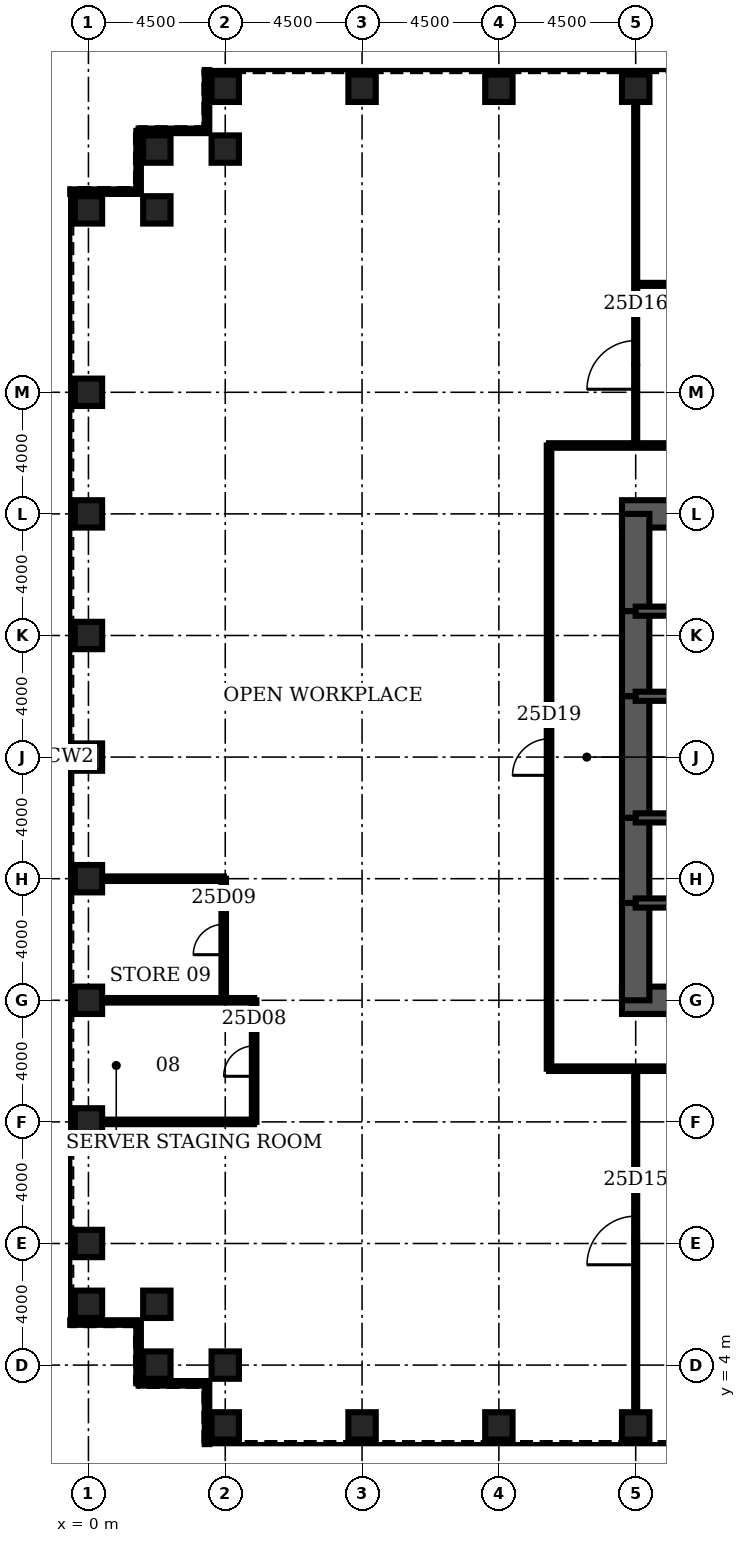
"""IFC4 building model, lengths in metres.
Left out: names, types, materials, properties, quantities, classifications, styles, units other than length and angle.
Written with IfcOpenShell. Run it as: python <this file> out.ifc"""

import sys

from ifc_helpers import new_model, si_unit, direction, frame, frame_2d, origin, origin_2d, place, context, subcontext, project, spatial, rectangle, hollow_rectangle, extrude, element, fill, save


model = new_model("IFC4")
c1 = context("Model", 3, precision=1e-05, world=origin(), true_north=direction((0.0, 1.0)))
c2 = subcontext(c1, "Body", "Model", "MODEL_VIEW")
j1 = project(units=[si_unit("LENGTHUNIT", "METRE"), si_unit("PLANEANGLEUNIT", "RADIAN")], contexts=[c1])
p1 = place(None, origin())
s1 = spatial("IfcSite", under=j1, at=p1, CompositionType="ELEMENT")
p2 = place(p1, origin())
s2 = spatial("IfcBuilding", under=s1, at=p2, CompositionType="ELEMENT")
p3 = place(p2, frame((0.0, 0.0, 117.3)))
s3 = spatial("IfcBuildingStorey", under=s2, at=p3, CompositionType="ELEMENT", Elevation=117.3)
for number, where, z_axis, x_axis in (
    (1, (4.5, 2.0, 0.0), (0.0, 0.0, 1.0), (0.0, 1.0, 0.0)),
    (2, (9.0, 2.0, 0.0), (0.0, 0.0, 1.0), (0.0, 1.0, 0.0)),
    (3, (13.5, 2.0, 0.0), (0.0, 0.0, 1.0), (0.0, 1.0, 0.0)),
    (4, (18.0, 2.0, 0.0), (0.0, 0.0, 1.0), (0.0, 1.0, 0.0)),
    (5, (18.0, 46.0, 0.0), (0.0, 0.0, 1.0), (0.0, 1.0, 0.0)),
    (6, (13.5, 46.0, 0.0), (0.0, 0.0, 1.0), (0.0, 1.0, 0.0)),
    (7, (9.0, 46.0, 0.0), (0.0, 0.0, 1.0), (0.0, 1.0, 0.0)),
    (8, (4.5, 46.0, 0.0), (0.0, 0.0, 1.0), (0.0, 1.0, 0.0)),
    (9, (4.5, 44.0, 0.0), (0.0, 0.0, 1.0), (0.0, 1.0, 0.0)),
    (10, (2.25, 44.0, 0.0), (0.0, 0.0, 1.0), (1.0, 0.0, 0.0)),
    (11, (2.25, 42.0, 0.0), (0.0, 0.0, 1.0), (1.0, 0.0, 0.0)),
    (12, (0.0, 42.0, 0.0), (0.0, 0.0, 1.0), (1.0, 0.0, 0.0)),
    (13, (0.0, 36.0, 0.0), (0.0, 0.0, 1.0), (1.0, 0.0, 0.0)),
    (14, (0.0, 32.0, 0.0), (0.0, 0.0, 1.0), (1.0, 0.0, 0.0)),
    (15, (0.0, 28.0, 0.0), (0.0, 0.0, 1.0), (1.0, 0.0, 0.0)),
    (16, (0.0, 24.0, 0.0), (0.0, 0.0, 1.0), (1.0, 0.0, 0.0)),
    (17, (0.0, 20.0, 0.0), (0.0, 0.0, 1.0), (1.0, 0.0, 0.0)),
    (18, (0.0, 16.0, 0.0), (0.0, 0.0, 1.0), (1.0, 0.0, 0.0)),
    (19, (0.0, 12.0, 0.0), (0.0, 0.0, 1.0), (1.0, 0.0, 0.0)),
    (20, (0.0, 8.0, 0.0), (0.0, 0.0, 1.0), (1.0, 0.0, 0.0)),
    (21, (0.0, 6.0, 0.0), (0.0, 0.0, 1.0), (1.0, 0.0, 0.0)),
    (22, (2.25, 6.0, 0.0), (0.0, 0.0, 1.0), (1.0, 0.0, 0.0)),
    (23, (2.25, 4.0, 0.0), (0.0, 0.0, 1.0), (1.0, 0.0, 0.0)),
    (24, (4.5, 4.0, 0.0), (0.0, 0.0, 1.0), (0.0, 1.0, 0.0)),
):
    element("IfcColumn", number, at=place(p3, frame(where, z_axis=z_axis, x_axis=x_axis)), inside=s3, PredefinedType="COLUMN", context=c2, shape_type="SweptSolid", body=[
        extrude(hollow_rectangle(XDim=0.9, YDim=0.9, WallThickness=0.11, at=origin_2d()), origin(), (0.0, 0.0, 1.0), 4.2),
    ])
for number, where, z_axis, x_axis in (
    (25, (17.55, 16.0, 0.0), (0.0, 0.0, 1.0), (1.0, 0.0, 0.0)),
    (26, (27.0, 32.0, 0.0), (0.0, 0.0, 1.0), (-1.0, 0.0, 0.0)),
):
    element("IfcWall", number, at=place(p3, frame(where, z_axis=z_axis, x_axis=x_axis)), inside=s3, PredefinedType="SHEAR", context=c2, shape_type="SweptSolid", body=[
        extrude(rectangle(XDim=9.45, YDim=0.9, at=frame_2d((4.725, 0.0))), origin(), (0.0, 0.0, 1.0), 4.2),
    ])
p4 = place(p3, frame((18.0, 32.0, 0.0), z_axis=(0.0, 0.0, 1.0), x_axis=(0.0, -1.0, 0.0)))
e27 = element("IfcWall", 27, at=p4, inside=s3, PredefinedType="SHEAR", context=c2, shape_type="SweptSolid", body=[
    extrude(rectangle(XDim=3.2, YDim=0.9, at=frame_2d((1.6, 0.0))), origin(), (0.0, 0.0, 1.0), 4.2),
])
p5 = place(p3, frame((18.0, 28.8, 0.0), z_axis=(0.0, 0.0, 1.0), x_axis=(0.0, -1.0, 0.0)))
e28 = element("IfcWall", 28, at=p5, inside=s3, PredefinedType="SHEAR", context=c2, shape_type="SweptSolid", body=[
    extrude(rectangle(XDim=2.8, YDim=0.9, at=frame_2d((1.4, 0.0))), origin(), (0.0, 0.0, 1.0), 4.2),
])
p6 = place(p5, frame((0.4, 0.0, 0.0)))
e29 = element("IfcOpeningElement", 29, at=p6, cuts=e28, PredefinedType="OPENING", context=c2, shape_type="SweptSolid", body=[
    extrude(rectangle(XDim=1.8, YDim=2.1, at=frame_2d((0.9, 1.05))), frame((0.0, 0.46, 0.0), z_axis=(0.0, -1.0, 0.0), x_axis=(1.0, 0.0, 0.0)), (0.0, 0.0, 1.0), 0.92),
])
p7 = place(p3, frame((18.0, 26.0, 0.0), z_axis=(0.0, 0.0, 1.0), x_axis=(0.0, -1.0, 0.0)))
e30 = element("IfcWall", 30, at=p7, inside=s3, PredefinedType="SHEAR", context=c2, shape_type="SweptSolid", body=[
    extrude(rectangle(XDim=4.0, YDim=0.9, at=frame_2d((2.0, 0.0))), origin(), (0.0, 0.0, 1.0), 4.2),
])
p8 = place(p3, frame((18.0, 22.0, 0.0), z_axis=(0.0, 0.0, 1.0), x_axis=(0.0, -1.0, 0.0)))
e31 = element("IfcWall", 31, at=p8, inside=s3, PredefinedType="SHEAR", context=c2, shape_type="SweptSolid", body=[
    extrude(rectangle(XDim=2.8, YDim=0.9, at=frame_2d((1.4, 0.0))), origin(), (0.0, 0.0, 1.0), 4.2),
])
p9 = place(p8, frame((0.6, 0.0, 0.0)))
e32 = element("IfcOpeningElement", 32, at=p9, cuts=e31, PredefinedType="OPENING", context=c2, shape_type="SweptSolid", body=[
    extrude(rectangle(XDim=1.8, YDim=2.1, at=frame_2d((0.9, 1.05))), frame((0.0, 0.46, 0.0), z_axis=(0.0, -1.0, 0.0), x_axis=(1.0, 0.0, 0.0)), (0.0, 0.0, 1.0), 0.92),
])
p10 = place(p3, frame((18.0, 19.2, 0.0), z_axis=(0.0, 0.0, 1.0), x_axis=(0.0, -1.0, 0.0)))
e33 = element("IfcWall", 33, at=p10, inside=s3, PredefinedType="SHEAR", context=c2, shape_type="SweptSolid", body=[
    extrude(rectangle(XDim=3.2, YDim=0.9, at=frame_2d((1.6, 0.0))), origin(), (0.0, 0.0, 1.0), 4.2),
])
p11 = place(p3, frame((18.0, 19.2, 0.0), z_axis=(0.0, 0.0, 1.0), x_axis=(1.0, 0.0, 0.0)))
e34 = element("IfcWall", 34, at=p11, inside=s3, PredefinedType="SOLIDWALL", context=c2, shape_type="SweptSolid", body=[
    extrude(rectangle(XDim=9.0, YDim=0.3, at=frame_2d((4.5, 0.0))), origin(), (0.0, 0.0, 1.0), 4.2),
])
p12 = place(p11, frame((0.65, 0.0, 0.0)))
e35 = element("IfcOpeningElement", 35, at=p12, cuts=e34, PredefinedType="OPENING", context=c2, shape_type="SweptSolid", body=[
    extrude(rectangle(XDim=1.0, YDim=2.1, at=frame_2d((0.5, 1.05))), frame((0.0, 0.16, 0.0), z_axis=(0.0, -1.0, 0.0), x_axis=(1.0, 0.0, 0.0)), (0.0, 0.0, 1.0), 0.32),
])
p13 = place(p3, frame((18.0, 28.8, 0.0), z_axis=(0.0, 0.0, 1.0), x_axis=(1.0, 0.0, 0.0)))
e36 = element("IfcWall", 36, at=p13, inside=s3, PredefinedType="SOLIDWALL", context=c2, shape_type="SweptSolid", body=[
    extrude(rectangle(XDim=9.0, YDim=0.3, at=frame_2d((4.5, 0.0))), origin(), (0.0, 0.0, 1.0), 4.2),
])
p14 = place(p13, frame((0.65, 0.0, 0.0)))
e37 = element("IfcOpeningElement", 37, at=p14, cuts=e36, PredefinedType="OPENING", context=c2, shape_type="SweptSolid", body=[
    extrude(rectangle(XDim=1.0, YDim=2.1, at=frame_2d((0.5, 1.05))), frame((0.0, 0.16, 0.0), z_axis=(0.0, -1.0, 0.0), x_axis=(1.0, 0.0, 0.0)), (0.0, 0.0, 1.0), 0.32),
])
p15 = place(p3, frame((18.0, 22.0, 0.0), z_axis=(0.0, 0.0, 1.0), x_axis=(1.0, 0.0, 0.0)))
e38 = element("IfcWall", 38, at=p15, inside=s3, PredefinedType="SOLIDWALL", context=c2, shape_type="SweptSolid", body=[
    extrude(rectangle(XDim=6.0, YDim=0.3, at=frame_2d((3.0, 0.0))), origin(), (0.0, 0.0, 1.0), 4.2),
])
p16 = place(p15, frame((2.0, 0.0, 0.0)))
e39 = element("IfcOpeningElement", 39, at=p16, cuts=e38, PredefinedType="OPENING", context=c2, shape_type="SweptSolid", body=[
    extrude(rectangle(XDim=1.0, YDim=2.1, at=frame_2d((0.5, 1.05))), frame((0.0, 0.16, 0.0), z_axis=(0.0, -1.0, 0.0), x_axis=(1.0, 0.0, 0.0)), (0.0, 0.0, 1.0), 0.32),
])
p17 = place(p3, frame((18.0, 26.0, 0.0), z_axis=(0.0, 0.0, 1.0), x_axis=(1.0, 0.0, 0.0)))
e40 = element("IfcWall", 40, at=p17, inside=s3, PredefinedType="SOLIDWALL", context=c2, shape_type="SweptSolid", body=[
    extrude(rectangle(XDim=6.0, YDim=0.3, at=frame_2d((3.0, 0.0))), origin(), (0.0, 0.0, 1.0), 4.2),
])
p18 = place(p3, frame((0.45, 12.0, 0.0), z_axis=(0.0, 0.0, 1.0), x_axis=(1.0, 0.0, 0.0)))
e41 = element("IfcWall", 41, at=p18, inside=s3, PredefinedType="PARTITIONING", context=c2, shape_type="SweptSolid", body=[
    extrude(rectangle(XDim=5.0, YDim=0.15, at=frame_2d((2.5, 0.0))), origin(), (0.0, 0.0, 1.0), 3.0),
])
p19 = place(p3, frame((15.15, 13.75, 0.0), z_axis=(0.0, 0.0, 1.0), x_axis=(1.0, 0.0, 0.0)))
e42 = element("IfcWall", 42, at=p19, inside=s3, PredefinedType="PARTITIONING", context=c2, shape_type="SweptSolid", body=[
    extrude(rectangle(XDim=41.7, YDim=0.15, at=frame_2d((20.85, 0.0))), origin(), (0.0, 0.0, 1.0), 3.0),
])
p20 = place(p19, frame((29.275, 0.0, 0.0)))
e43 = element("IfcOpeningElement", 43, at=p20, cuts=e42, PredefinedType="OPENING", context=c2, shape_type="SweptSolid", body=[
    extrude(rectangle(XDim=1.2, YDim=2.1, at=frame_2d((0.6, 1.05))), frame((0.0, 0.085, 0.0), z_axis=(0.0, -1.0, 0.0), x_axis=(1.0, 0.0, 0.0)), (0.0, 0.0, 1.0), 0.17),
])
p21 = place(p3, frame((0.45, 16.0, 0.0), z_axis=(0.0, 0.0, 1.0), x_axis=(1.0, 0.0, 0.0)))
e44 = element("IfcWall", 44, at=p21, inside=s3, PredefinedType="PARTITIONING", context=c2, shape_type="SweptSolid", body=[
    extrude(rectangle(XDim=5.0, YDim=0.15, at=frame_2d((2.5, 0.0))), origin(), (0.0, 0.0, 1.0), 3.0),
])
p22 = place(p3, frame((0.45, 20.0, 0.0), z_axis=(0.0, 0.0, 1.0), x_axis=(1.0, 0.0, 0.0)))
e45 = element("IfcWall", 45, at=p22, inside=s3, PredefinedType="PARTITIONING", context=c2, shape_type="SweptSolid", body=[
    extrude(rectangle(XDim=4.0, YDim=0.15, at=frame_2d((2.0, 0.0))), origin(), (0.0, 0.0, 1.0), 3.0),
])
p23 = place(p3, frame((15.15, 34.25, 0.0), z_axis=(0.0, 0.0, 1.0), x_axis=(1.0, 0.0, 0.0)))
e46 = element("IfcWall", 46, at=p23, inside=s3, PredefinedType="PARTITIONING", context=c2, shape_type="SweptSolid", body=[
    extrude(rectangle(XDim=41.7, YDim=0.15, at=frame_2d((20.85, 0.0))), origin(), (0.0, 0.0, 1.0), 3.0),
])
p24 = place(p23, frame((20.25, 0.0, 0.0)))
e47 = element("IfcOpeningElement", 47, at=p24, cuts=e46, PredefinedType="OPENING", context=c2, shape_type="SweptSolid", body=[
    extrude(rectangle(XDim=1.2, YDim=2.1, at=frame_2d((0.6, 1.05))), frame((0.0, 0.085, 0.0), z_axis=(0.0, -1.0, 0.0), x_axis=(1.0, 0.0, 0.0)), (0.0, 0.0, 1.0), 0.17),
])
p25 = place(p3, frame((18.0, 39.55, 0.0), z_axis=(0.0, 0.0, 1.0), x_axis=(1.0, 0.0, 0.0)))
e48 = element("IfcWall", 48, at=p25, inside=s3, PredefinedType="PARTITIONING", context=c2, shape_type="SweptSolid", body=[
    extrude(rectangle(XDim=36.0, YDim=0.1, at=frame_2d((18.0, 0.0))), origin(), (0.0, 0.0, 1.0), 3.0),
])
p26 = place(p25, frame((4.0, 0.0, 0.0)))
e49 = element("IfcOpeningElement", 49, at=p26, cuts=e48, PredefinedType="OPENING", context=c2, shape_type="SweptSolid", body=[
    extrude(rectangle(XDim=1.0, YDim=2.1, at=frame_2d((0.5, 1.05))), frame((0.0, 0.06, 0.0), z_axis=(0.0, -1.0, 0.0), x_axis=(1.0, 0.0, 0.0)), (0.0, 0.0, 1.0), 0.12),
])
p27 = place(p25, frame((13.0, 0.0, 0.0)))
e50 = element("IfcOpeningElement", 50, at=p27, cuts=e48, PredefinedType="OPENING", context=c2, shape_type="SweptSolid", body=[
    extrude(rectangle(XDim=1.0, YDim=2.1, at=frame_2d((0.5, 1.05))), frame((0.0, 0.06, 0.0), z_axis=(0.0, -1.0, 0.0), x_axis=(1.0, 0.0, 0.0)), (0.0, 0.0, 1.0), 0.12),
])
p28 = place(p25, frame((22.0, 0.0, 0.0)))
e51 = element("IfcOpeningElement", 51, at=p28, cuts=e48, PredefinedType="OPENING", context=c2, shape_type="SweptSolid", body=[
    extrude(rectangle(XDim=1.0, YDim=2.1, at=frame_2d((0.5, 1.05))), frame((0.0, 0.06, 0.0), z_axis=(0.0, -1.0, 0.0), x_axis=(1.0, 0.0, 0.0)), (0.0, 0.0, 1.0), 0.12),
])
p29 = place(p25, frame((31.0, 0.0, 0.0)))
e52 = element("IfcOpeningElement", 52, at=p29, cuts=e48, PredefinedType="OPENING", context=c2, shape_type="SweptSolid", body=[
    extrude(rectangle(XDim=1.0, YDim=2.1, at=frame_2d((0.5, 1.05))), frame((0.0, 0.06, 0.0), z_axis=(0.0, -1.0, 0.0), x_axis=(1.0, 0.0, 0.0)), (0.0, 0.0, 1.0), 0.12),
])
p30 = place(p3, frame((4.45, 16.0, 0.0), z_axis=(0.0, 0.0, 1.0), x_axis=(0.0, 1.0, 0.0)))
e53 = element("IfcWall", 53, at=p30, inside=s3, PredefinedType="PARTITIONING", context=c2, shape_type="SweptSolid", body=[
    extrude(rectangle(XDim=4.0, YDim=0.15, at=frame_2d((2.0, 0.0))), origin(), (0.0, 0.0, 1.0), 3.0),
])
p31 = place(p30, frame((1.5, 0.0, 0.0)))
e54 = element("IfcOpeningElement", 54, at=p31, cuts=e53, PredefinedType="OPENING", context=c2, shape_type="SweptSolid", body=[
    extrude(rectangle(XDim=1.0, YDim=2.1, at=frame_2d((0.5, 1.05))), frame((0.0, 0.085, 0.0), z_axis=(0.0, -1.0, 0.0), x_axis=(1.0, 0.0, 0.0)), (0.0, 0.0, 1.0), 0.17),
])
p32 = place(p3, frame((5.45, 12.0, 0.0), z_axis=(0.0, 0.0, 1.0), x_axis=(0.0, 1.0, 0.0)))
e55 = element("IfcWall", 55, at=p32, inside=s3, PredefinedType="PARTITIONING", context=c2, shape_type="SweptSolid", body=[
    extrude(rectangle(XDim=4.0, YDim=0.15, at=frame_2d((2.0, 0.0))), origin(), (0.0, 0.0, 1.0), 3.0),
])
p33 = place(p32, frame((1.5, 0.0, 0.0)))
e56 = element("IfcOpeningElement", 56, at=p33, cuts=e55, PredefinedType="OPENING", context=c2, shape_type="SweptSolid", body=[
    extrude(rectangle(XDim=1.0, YDim=2.1, at=frame_2d((0.5, 1.05))), frame((0.0, 0.085, 0.0), z_axis=(0.0, -1.0, 0.0), x_axis=(1.0, 0.0, 0.0)), (0.0, 0.0, 1.0), 0.17),
])
p34 = place(p3, frame((15.15, 13.75, 0.0), z_axis=(0.0, 0.0, 1.0), x_axis=(0.0, 1.0, 0.0)))
e57 = element("IfcWall", 57, at=p34, inside=s3, PredefinedType="PARTITIONING", context=c2, shape_type="SweptSolid", body=[
    extrude(rectangle(XDim=20.5, YDim=0.15, at=frame_2d((10.25, 0.0))), origin(), (0.0, 0.0, 1.0), 3.0),
])
p35 = place(p34, frame((9.65, 0.0, 0.0)))
e58 = element("IfcOpeningElement", 58, at=p35, cuts=e57, PredefinedType="OPENING", context=c2, shape_type="SweptSolid", body=[
    extrude(rectangle(XDim=1.2, YDim=2.1, at=frame_2d((0.6, 1.05))), frame((0.0, 0.085, 0.0), z_axis=(0.0, -1.0, 0.0), x_axis=(1.0, 0.0, 0.0)), (0.0, 0.0, 1.0), 0.17),
])
p36 = place(p3, frame((18.0, 2.45, 0.0), z_axis=(0.0, 0.0, 1.0), x_axis=(0.0, 1.0, 0.0)))
e59 = element("IfcWall", 59, at=p36, inside=s3, PredefinedType="PARTITIONING", context=c2, shape_type="SweptSolid", body=[
    extrude(rectangle(XDim=11.3, YDim=0.1, at=frame_2d((5.65, 0.0))), origin(), (0.0, 0.0, 1.0), 3.0),
])
p37 = place(p36, frame((4.85, 0.0, 0.0)))
e60 = element("IfcOpeningElement", 60, at=p37, cuts=e59, PredefinedType="OPENING", context=c2, shape_type="SweptSolid", body=[
    extrude(rectangle(XDim=1.6, YDim=2.1, at=frame_2d((0.8, 1.05))), frame((0.0, 0.06, 0.0), z_axis=(0.0, -1.0, 0.0), x_axis=(1.0, 0.0, 0.0)), (0.0, 0.0, 1.0), 0.12),
])
p38 = place(p3, frame((18.0, 34.25, 0.0), z_axis=(0.0, 0.0, 1.0), x_axis=(0.0, 1.0, 0.0)))
e61 = element("IfcWall", 61, at=p38, inside=s3, PredefinedType="PARTITIONING", context=c2, shape_type="SweptSolid", body=[
    extrude(rectangle(XDim=11.3, YDim=0.1, at=frame_2d((5.65, 0.0))), origin(), (0.0, 0.0, 1.0), 3.0),
])
p39 = place(p38, frame((1.85, 0.0, 0.0)))
e62 = element("IfcOpeningElement", 62, at=p39, cuts=e61, PredefinedType="OPENING", context=c2, shape_type="SweptSolid", body=[
    extrude(rectangle(XDim=1.6, YDim=2.1, at=frame_2d((0.8, 1.05))), frame((0.0, 0.06, 0.0), z_axis=(0.0, -1.0, 0.0), x_axis=(1.0, 0.0, 0.0)), (0.0, 0.0, 1.0), 0.12),
])
p40 = place(p3, frame((3.9, 46.6, 0.0), z_axis=(0.0, 0.0, 1.0), x_axis=(0.0, -1.0, 0.0)))
e63 = element("IfcWall", 63, at=p40, inside=s3, PredefinedType="ELEMENTEDWALL", context=c2, shape_type="SweptSolid", body=[
    extrude(rectangle(XDim=2.0, YDim=0.15, at=frame_2d((1.0, 0.0))), origin(), (0.0, 0.0, 1.0), 4.04),
])
p41 = place(p3, frame((3.9, 44.6, 0.0), z_axis=(0.0, 0.0, 1.0), x_axis=(-1.0, 0.0, 0.0)))
e64 = element("IfcWall", 64, at=p41, inside=s3, PredefinedType="ELEMENTEDWALL", context=c2, shape_type="SweptSolid", body=[
    extrude(rectangle(XDim=2.25, YDim=0.15, at=frame_2d((1.125, 0.0))), origin(), (0.0, 0.0, 1.0), 4.04),
])
p42 = place(p3, frame((1.65, 44.6, 0.0), z_axis=(0.0, 0.0, 1.0), x_axis=(0.0, -1.0, 0.0)))
e65 = element("IfcWall", 65, at=p42, inside=s3, PredefinedType="ELEMENTEDWALL", context=c2, shape_type="SweptSolid", body=[
    extrude(rectangle(XDim=2.0, YDim=0.15, at=frame_2d((1.0, 0.0))), origin(), (0.0, 0.0, 1.0), 4.04),
])
for number, where, z_axis, x_axis in (
    (66, (1.65, 42.6, 0.0), (0.0, 0.0, 1.0), (-1.0, 0.0, 0.0)),
    (67, (-0.6, 5.4, 0.0), (0.0, 0.0, 1.0), (1.0, 0.0, 0.0)),
):
    element("IfcWall", number, at=place(p3, frame(where, z_axis=z_axis, x_axis=x_axis)), inside=s3, PredefinedType="ELEMENTEDWALL", context=c2, shape_type="SweptSolid", body=[
        extrude(rectangle(XDim=2.25, YDim=0.15, at=frame_2d((1.125, 0.0))), origin(), (0.0, 0.0, 1.0), 4.04),
    ])
p43 = place(p3, frame((1.65, 5.4, 0.0), z_axis=(0.0, 0.0, 1.0), x_axis=(0.0, -1.0, 0.0)))
e68 = element("IfcWall", 68, at=p43, inside=s3, PredefinedType="ELEMENTEDWALL", context=c2, shape_type="SweptSolid", body=[
    extrude(rectangle(XDim=2.0, YDim=0.15, at=frame_2d((1.0, 0.0))), origin(), (0.0, 0.0, 1.0), 4.04),
])
p44 = place(p3, frame((1.65, 3.4, 0.0), z_axis=(0.0, 0.0, 1.0), x_axis=(1.0, 0.0, 0.0)))
e69 = element("IfcWall", 69, at=p44, inside=s3, PredefinedType="ELEMENTEDWALL", context=c2, shape_type="SweptSolid", body=[
    extrude(rectangle(XDim=2.25, YDim=0.15, at=frame_2d((1.125, 0.0))), origin(), (0.0, 0.0, 1.0), 4.04),
])
p45 = place(p3, frame((3.9, 3.4, 0.0), z_axis=(0.0, 0.0, 1.0), x_axis=(0.0, -1.0, 0.0)))
e70 = element("IfcWall", 70, at=p45, inside=s3, PredefinedType="ELEMENTEDWALL", context=c2, shape_type="SweptSolid", body=[
    extrude(rectangle(XDim=2.0, YDim=0.15, at=frame_2d((1.0, 0.0))), origin(), (0.0, 0.0, 1.0), 4.04),
])
p46 = place(p33, origin())
e71 = element("IfcDoor", 71, at=p46, inside=s3, OperationType="SINGLE_SWING_LEFT", PredefinedType="DOOR", context=c2, shape_type="SweptSolid", body=[
    extrude(rectangle(XDim=1.0, YDim=2.1, at=frame_2d((0.5, 1.05))), frame((0.0, 0.025, 0.0), z_axis=(0.0, -1.0, 0.0), x_axis=(1.0, 0.0, 0.0)), (0.0, 0.0, 1.0), 0.05),
])
fill(e56, e71)
p47 = place(p31, origin())
e72 = element("IfcDoor", 72, at=p47, inside=s3, OperationType="SINGLE_SWING_LEFT", PredefinedType="DOOR", context=c2, shape_type="SweptSolid", body=[
    extrude(rectangle(XDim=1.0, YDim=2.1, at=frame_2d((0.5, 1.05))), frame((0.0, 0.025, 0.0), z_axis=(0.0, -1.0, 0.0), x_axis=(1.0, 0.0, 0.0)), (0.0, 0.0, 1.0), 0.05),
])
fill(e54, e72)
p48 = place(p37, origin())
e73 = element("IfcDoor", 73, at=p48, inside=s3, OperationType="SINGLE_SWING_LEFT", PredefinedType="DOOR", context=c2, shape_type="SweptSolid", body=[
    extrude(rectangle(XDim=1.6, YDim=2.1, at=frame_2d((0.8, 1.05))), frame((0.0, 0.025, 0.0), z_axis=(0.0, -1.0, 0.0), x_axis=(1.0, 0.0, 0.0)), (0.0, 0.0, 1.0), 0.05),
])
fill(e60, e73)
p49 = place(p39, origin())
e74 = element("IfcDoor", 74, at=p49, inside=s3, OperationType="SINGLE_SWING_LEFT", PredefinedType="DOOR", context=c2, shape_type="SweptSolid", body=[
    extrude(rectangle(XDim=1.6, YDim=2.1, at=frame_2d((0.8, 1.05))), frame((0.0, 0.025, 0.0), z_axis=(0.0, -1.0, 0.0), x_axis=(1.0, 0.0, 0.0)), (0.0, 0.0, 1.0), 0.05),
])
fill(e62, e74)
p50 = place(p35, origin())
e75 = element("IfcDoor", 75, at=p50, inside=s3, OperationType="SINGLE_SWING_LEFT", PredefinedType="DOOR", context=c2, shape_type="SweptSolid", body=[
    extrude(rectangle(XDim=1.2, YDim=2.1, at=frame_2d((0.6, 1.05))), frame((0.0, 0.025, 0.0), z_axis=(0.0, -1.0, 0.0), x_axis=(1.0, 0.0, 0.0)), (0.0, 0.0, 1.0), 0.05),
])
fill(e58, e75)
p51 = place(p12, origin())
e76 = element("IfcDoor", 76, at=p51, inside=s3, OperationType="SINGLE_SWING_LEFT", PredefinedType="DOOR", context=c2, shape_type="SweptSolid", body=[
    extrude(rectangle(XDim=1.0, YDim=2.1, at=frame_2d((0.5, 1.05))), frame((0.0, 0.025, 0.0), z_axis=(0.0, -1.0, 0.0), x_axis=(1.0, 0.0, 0.0)), (0.0, 0.0, 1.0), 0.05),
])
fill(e35, e76)
p52 = place(p14, origin())
e77 = element("IfcDoor", 77, at=p52, inside=s3, OperationType="SINGLE_SWING_LEFT", PredefinedType="DOOR", context=c2, shape_type="SweptSolid", body=[
    extrude(rectangle(XDim=1.0, YDim=2.1, at=frame_2d((0.5, 1.05))), frame((0.0, 0.025, 0.0), z_axis=(0.0, -1.0, 0.0), x_axis=(1.0, 0.0, 0.0)), (0.0, 0.0, 1.0), 0.05),
])
fill(e37, e77)
p53 = place(p9, origin())
e78 = element("IfcDoor", 78, at=p53, inside=s3, OperationType="SINGLE_SWING_LEFT", PredefinedType="DOOR", context=c2, shape_type="SweptSolid", body=[
    extrude(rectangle(XDim=1.8, YDim=2.1, at=frame_2d((0.9, 1.05))), frame((0.0, 0.45, 0.0), z_axis=(0.0, -1.0, 0.0), x_axis=(1.0, 0.0, 0.0)), (0.0, 0.0, 1.0), 0.899),
])
fill(e32, e78)
p54 = place(p6, origin())
e79 = element("IfcDoor", 79, at=p54, inside=s3, OperationType="SINGLE_SWING_LEFT", PredefinedType="DOOR", context=c2, shape_type="SweptSolid", body=[
    extrude(rectangle(XDim=1.8, YDim=2.1, at=frame_2d((0.9, 1.05))), frame((0.0, 0.45, 0.0), z_axis=(0.0, -1.0, 0.0), x_axis=(1.0, 0.0, 0.0)), (0.0, 0.0, 1.0), 0.899),
])
fill(e29, e79)
save(model, sys.argv[1])
